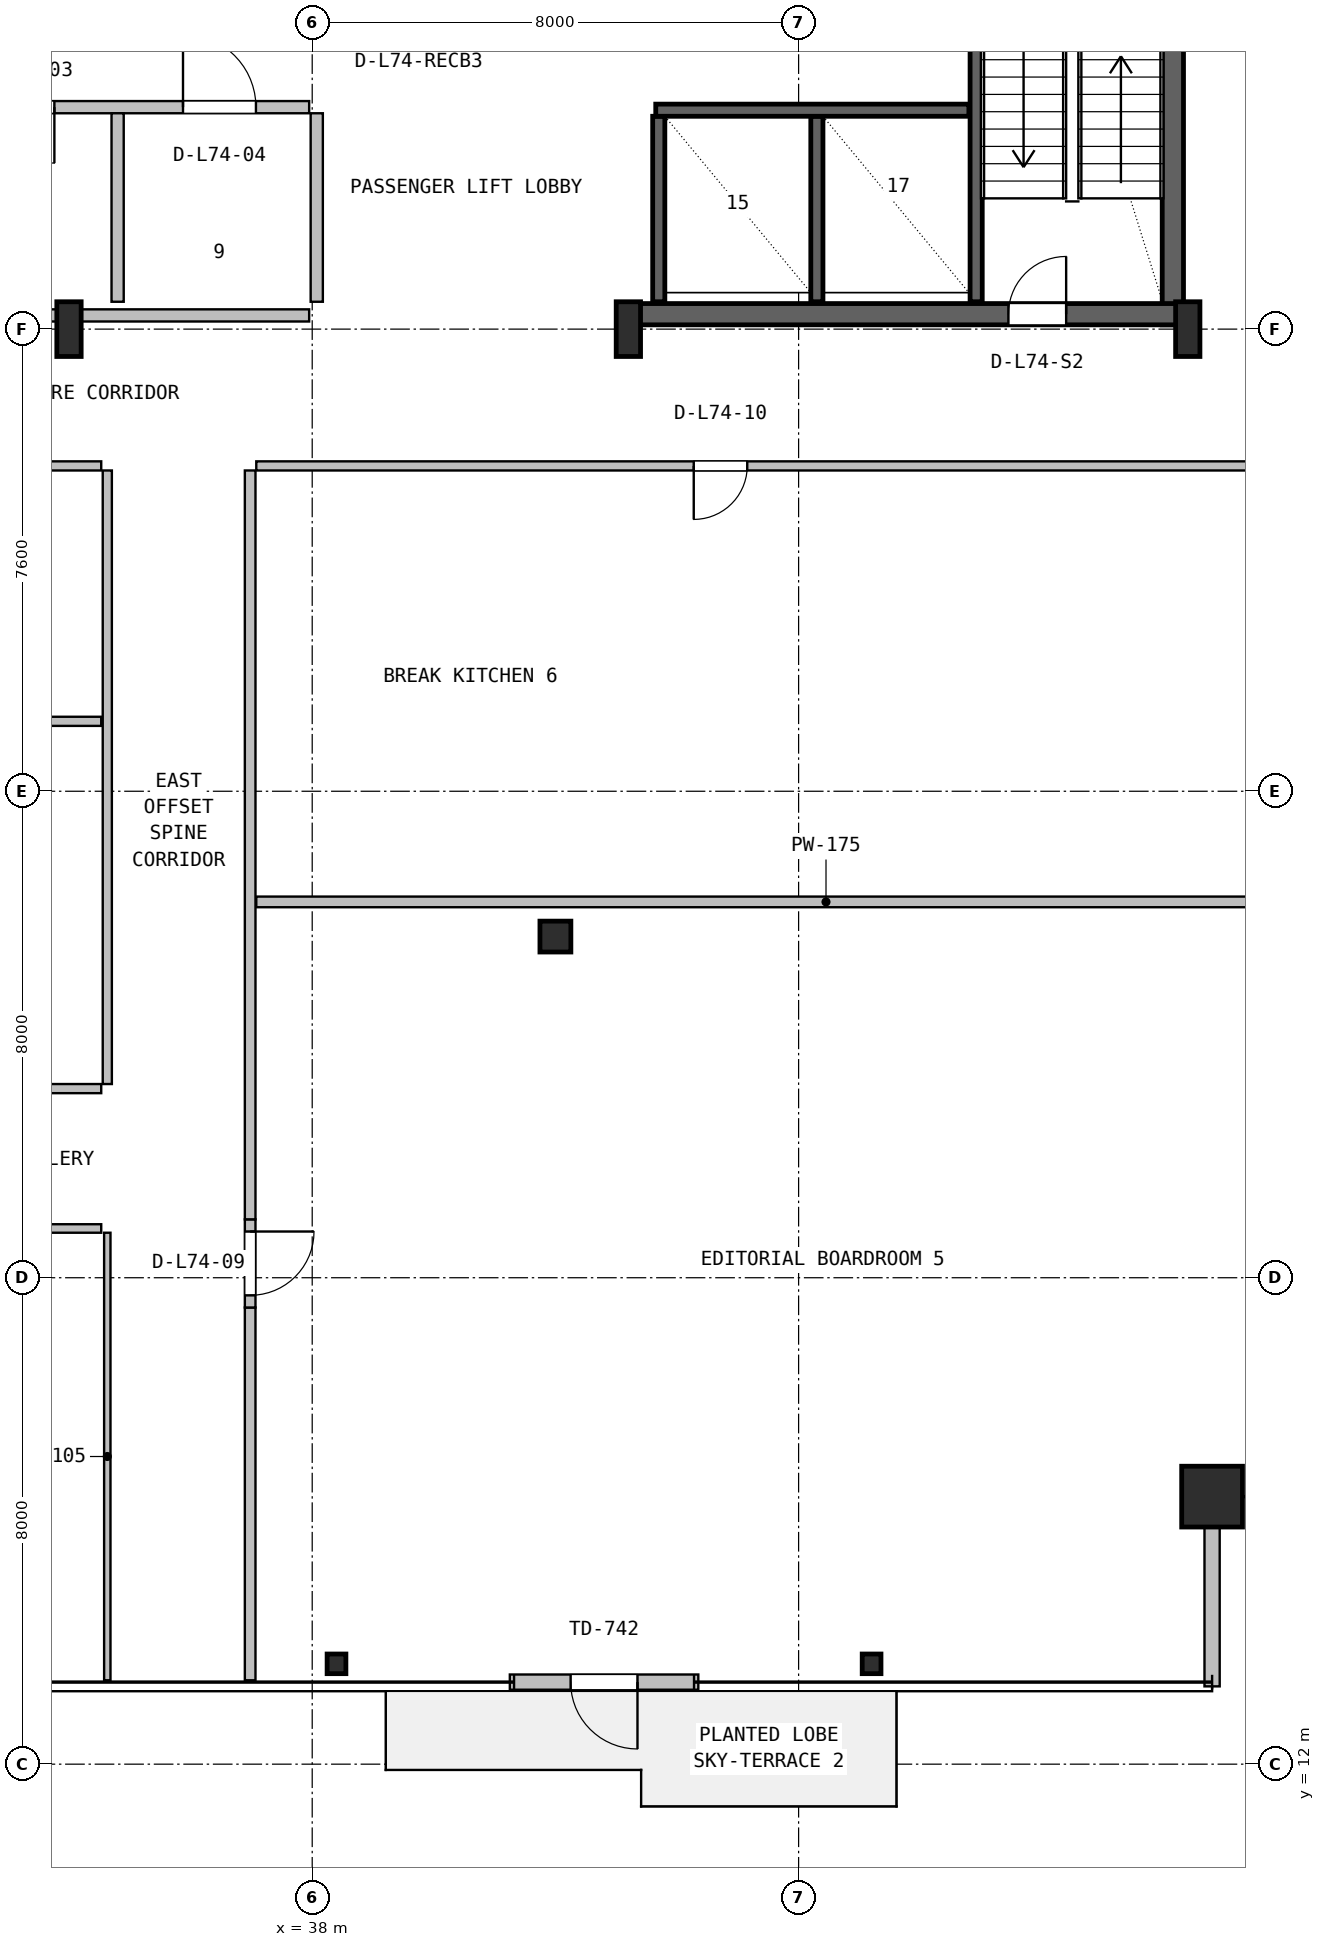
"""IFC4 building model, lengths in metres.
Left out: names, types, materials, properties, quantities, classifications, styles, units other than length and angle.
Written with IfcOpenShell. Run it as: python <this file> out.ifc"""

import sys

from ifc_helpers import new_model, si_unit, direction, frame, frame_2d, origin, origin_2d, place, context, subcontext, project, spatial, rectangle, hollow_rectangle, hollow_circle, i_section, extrude, source, transform, mapped, element, fill, save


model = new_model("IFC4")
c1 = context("Model", 3, precision=1e-05, world=origin(), true_north=direction((0.0, 1.0)))
c2 = subcontext(c1, "Body", "Model", "MODEL_VIEW")
j1 = project(units=[si_unit("LENGTHUNIT", "METRE"), si_unit("PLANEANGLEUNIT", "RADIAN")], contexts=[c1])
p1 = place(None, origin())
s1 = spatial("IfcSite", under=j1, at=p1, CompositionType="ELEMENT")
p2 = place(p1, origin())
s2 = spatial("IfcBuilding", under=s1, at=p2, CompositionType="ELEMENT")
p3 = place(p2, frame((0.0, 0.0, 296.4)))
s3 = spatial("IfcBuildingStorey", under=s2, at=p3, CompositionType="ELEMENT", Elevation=296.4)
p4 = place(p3, frame((52.155, 35.67, 0.0), z_axis=(0.0, 0.0, 1.0), x_axis=(0.0, 1.0, 0.0)))
e1 = element("IfcWall", 1, at=p4, inside=s3, PredefinedType="SHEAR", context=c2, shape_type="SweptSolid", body=[
    extrude(rectangle(XDim=11.13, YDim=0.35, at=frame_2d((5.565, 0.0))), origin(), (0.0, 0.0, 1.0), 3.52),
])
p5 = place(p3, frame((43.2, 35.845, 0.0), z_axis=(0.0, 0.0, 1.0), x_axis=(1.0, 0.0, 0.0)))
e2 = element("IfcWall", 2, at=p5, inside=s3, PredefinedType="SHEAR", context=c2, shape_type="SweptSolid", body=[
    extrude(rectangle(XDim=9.13, YDim=0.35, at=frame_2d((4.565, 0.0))), origin(), (0.0, 0.0, 1.0), 3.52),
])
p6 = place(p5, frame((6.25, 0.0, 0.0)))
e3 = element("IfcOpeningElement", 3, at=p6, cuts=e2, PredefinedType="OPENING", context=c2, shape_type="SweptSolid", body=[
    extrude(rectangle(XDim=0.95, YDim=2.1, at=frame_2d((0.475, 1.05))), frame((0.0, 0.185, 0.0), z_axis=(0.0, -1.0, 0.0), x_axis=(1.0, 0.0, 0.0)), (0.0, 0.0, 1.0), 0.37),
])
m1 = source(origin(), c2, "Body", "SweptSolid", [
    extrude(i_section(OverallWidth=0.4, OverallDepth=0.9, WebThickness=0.016, FlangeThickness=0.028, FilletRadius=0.016, at=origin_2d()), origin(), (0.0, 0.0, 1.0), 3.8),
])
for number, where, z_axis, x_axis in (
    (4, (34.0, 35.6, 0.0), (0.0, 0.0, 1.0), (1.0, 0.0, 0.0)),
    (5, (43.2, 35.6, 0.0), (0.0, 0.0, 1.0), (1.0, 0.0, 0.0)),
    (6, (52.4, 35.6, 0.0), (0.0, 0.0, 1.0), (1.0, 0.0, 0.0)),
):
    element("IfcColumn", number, at=place(p3, frame(where, z_axis=z_axis, x_axis=x_axis)), inside=s3, PredefinedType="COLUMN", context=c2, shape_type="MappedRepresentation", body=[
        mapped(m1, transform((0.0, 0.0, 0.0), x_axis=(1.0, 0.0, 0.0), y_axis=(0.0, 1.0, 0.0), z_axis=(0.0, 0.0, 1.0), scale=1.0)),
    ])
m2 = source(origin(), c2, "Body", "SweptSolid", [
    extrude(hollow_rectangle(XDim=1.0, YDim=1.0, WallThickness=0.04, at=origin_2d()), origin(), (0.0, 0.0, 1.0), 3.8),
])
p7 = place(p3, frame((52.8, 16.4, 0.0), z_axis=(0.0, 0.0, 1.0), x_axis=(1.0, 0.0, 0.0)))
e7 = element("IfcColumn", 7, at=p7, inside=s3, PredefinedType="COLUMN", context=c2, shape_type="MappedRepresentation", body=[
    mapped(m2, transform((0.0, 0.0, 0.0), x_axis=(1.0, 0.0, 0.0), y_axis=(0.0, 1.0, 0.0), z_axis=(0.0, 0.0, 1.0), scale=1.0)),
])
m3 = source(origin(), c2, "Body", "SweptSolid", [
    extrude(i_section(OverallWidth=0.309, OverallDepth=0.323, WebThickness=0.014, FlangeThickness=0.023, FilletRadius=0.015, at=origin_2d()), origin(), (0.0, 0.0, 1.0), 3.8),
])
for number, where, z_axis, x_axis in (
    (8, (38.4, 13.65, 0.0), (0.0, 0.0, 1.0), (1.0, 0.0, 0.0)),
    (9, (47.2, 13.65, 0.0), (0.0, 0.0, 1.0), (1.0, 0.0, 0.0)),
):
    element("IfcColumn", number, at=place(p3, frame(where, z_axis=z_axis, x_axis=x_axis)), inside=s3, PredefinedType="COLUMN", context=c2, shape_type="MappedRepresentation", body=[
        mapped(m3, transform((0.0, 0.0, 0.0), x_axis=(1.0, 0.0, 0.0), y_axis=(0.0, 1.0, 0.0), z_axis=(0.0, 0.0, 1.0), scale=1.0)),
    ])
m4 = source(origin(), c2, "Body", "SweptSolid", [
    extrude(hollow_circle(Radius=0.254, WallThickness=0.02, at=origin_2d()), origin(), (0.0, 0.0, 1.0), 3.8),
])
p8 = place(p3, frame((42.0, 25.61, 0.0), z_axis=(0.0, 0.0, 1.0), x_axis=(1.0, 0.0, 0.0)))
e10 = element("IfcColumn", 10, at=p8, inside=s3, PredefinedType="COLUMN", context=c2, shape_type="MappedRepresentation", body=[
    mapped(m4, transform((0.0, 0.0, 0.0), x_axis=(1.0, 0.0, 0.0), y_axis=(0.0, 1.0, 0.0), z_axis=(0.0, 0.0, 1.0), scale=1.0)),
])
p9 = place(p3, frame((41.25, 13.35, 0.0), z_axis=(0.0, 0.0, 1.0), x_axis=(1.0, 0.0, 0.0)))
e11 = element("IfcWall", 11, at=p9, inside=s3, PredefinedType="SOLIDWALL", context=c2, shape_type="SweptSolid", body=[
    extrude(rectangle(XDim=3.1, YDim=0.25, at=frame_2d((1.55, 0.0))), origin(), (0.0, 0.0, 1.0), 3.5),
])
p10 = place(p9, frame((1.0, 0.0, 0.0)))
e12 = element("IfcOpeningElement", 12, at=p10, cuts=e11, PredefinedType="OPENING", context=c2, shape_type="SweptSolid", body=[
    extrude(rectangle(XDim=1.1, YDim=2.15, at=frame_2d((0.55, 1.075))), frame((0.0, 0.135, 0.0), z_axis=(0.0, -1.0, 0.0), x_axis=(1.0, 0.0, 0.0)), (0.0, 0.0, 1.0), 0.27),
])
p11 = place(p3, frame((52.8, 13.28, 0.0), z_axis=(0.0, 0.0, 1.0), x_axis=(0.0, 1.0, 0.0)))
e13 = element("IfcWall", 13, at=p11, inside=s3, PredefinedType="SOLIDWALL", context=c2, shape_type="SweptSolid", body=[
    extrude(rectangle(XDim=3.2, YDim=0.25, at=frame_2d((1.6, 0.0))), origin(), (0.0, 0.0, 1.0), 3.141),
])
p12 = place(p3, frame((48.92, 36.05, 0.0), z_axis=(0.0, 0.0, 1.0), x_axis=(0.0, 1.0, 0.0)))
e14 = element("IfcWall", 14, at=p12, inside=s3, PredefinedType="SHEAR", context=c2, shape_type="SweptSolid", body=[
    extrude(rectangle(XDim=10.5, YDim=0.2, at=frame_2d((5.25, 0.0))), origin(), (0.0, 0.0, 1.0), 3.52),
])
for number, where, z_axis, x_axis in (
    (15, (43.7, 36.05, 0.0), (0.0, 0.0, 1.0), (0.0, 1.0, 0.0)),
    (16, (46.3, 36.05, 0.0), (0.0, 0.0, 1.0), (0.0, 1.0, 0.0)),
):
    element("IfcWall", number, at=place(p3, frame(where, z_axis=z_axis, x_axis=x_axis)), inside=s3, PredefinedType="SHEAR", context=c2, shape_type="SweptSolid", body=[
        extrude(rectangle(XDim=3.05, YDim=0.2, at=frame_2d((1.525, 0.0))), origin(), (0.0, 0.0, 1.0), 3.52),
    ])
p13 = place(p3, frame((43.65, 39.2, 0.0), z_axis=(0.0, 0.0, 1.0), x_axis=(1.0, 0.0, 0.0)))
e17 = element("IfcWall", 17, at=p13, inside=s3, PredefinedType="SHEAR", context=c2, shape_type="SweptSolid", body=[
    extrude(rectangle(XDim=5.15, YDim=0.2, at=frame_2d((2.575, 0.0))), origin(), (0.0, 0.0, 1.0), 3.52),
])
p14 = place(p3, frame((25.0, 35.825, 0.0), z_axis=(0.0, 0.0, 1.0), x_axis=(1.0, 0.0, 0.0)))
e18 = element("IfcWall", 18, at=p14, inside=s3, PredefinedType="SOLIDWALL", context=c2, shape_type="SweptSolid", body=[
    extrude(rectangle(XDim=12.95, YDim=0.2, at=frame_2d((6.475, 0.0))), origin(), (0.0, 0.0, 1.0), 2.545),
])
p15 = place(p3, frame((25.0, 39.25, 0.0), z_axis=(0.0, 0.0, 1.0), x_axis=(1.0, 0.0, 0.0)))
e19 = element("IfcWall", 19, at=p15, inside=s3, PredefinedType="SOLIDWALL", context=c2, shape_type="SweptSolid", body=[
    extrude(rectangle(XDim=12.95, YDim=0.2, at=frame_2d((6.475, 0.0))), origin(), (0.0, 0.0, 1.0), 3.5),
])
p16 = place(p15, frame((1.1, 0.0, 0.0)))
e20 = element("IfcOpeningElement", 20, at=p16, cuts=e19, PredefinedType="OPENING", context=c2, shape_type="SweptSolid", body=[
    extrude(rectangle(XDim=0.9, YDim=2.06, at=frame_2d((0.45, 1.03))), frame((0.0, 0.11, 0.0), z_axis=(0.0, -1.0, 0.0), x_axis=(1.0, 0.0, 0.0)), (0.0, 0.0, 1.0), 0.22),
])
p17 = place(p15, frame((4.5, 0.0, 0.0)))
e21 = element("IfcOpeningElement", 21, at=p17, cuts=e19, PredefinedType="OPENING", context=c2, shape_type="SweptSolid", body=[
    extrude(rectangle(XDim=0.9, YDim=2.06, at=frame_2d((0.45, 1.03))), frame((0.0, 0.11, 0.0), z_axis=(0.0, -1.0, 0.0), x_axis=(1.0, 0.0, 0.0)), (0.0, 0.0, 1.0), 0.22),
])
p18 = place(p15, frame((7.84, 0.0, 0.0)))
e22 = element("IfcOpeningElement", 22, at=p18, cuts=e19, PredefinedType="OPENING", context=c2, shape_type="SweptSolid", body=[
    extrude(rectangle(XDim=0.92, YDim=2.08, at=frame_2d((0.46, 1.04))), frame((0.0, 0.11, 0.0), z_axis=(0.0, -1.0, 0.0), x_axis=(1.0, 0.0, 0.0)), (0.0, 0.0, 1.0), 0.22),
])
p19 = place(p15, frame((10.875, 0.0, 0.0)))
e23 = element("IfcOpeningElement", 23, at=p19, cuts=e19, PredefinedType="OPENING", context=c2, shape_type="SweptSolid", body=[
    extrude(rectangle(XDim=1.2, YDim=2.1, at=frame_2d((0.6, 1.05))), frame((0.0, 0.11, 0.0), z_axis=(0.0, -1.0, 0.0), x_axis=(1.0, 0.0, 0.0)), (0.0, 0.0, 1.0), 0.22),
])
for number, where, z_axis, x_axis in (
    (24, (34.8, 36.05, 0.0), (0.0, 0.0, 1.0), (0.0, 1.0, 0.0)),
    (25, (38.075, 36.05, 0.0), (0.0, 0.0, 1.0), (0.0, 1.0, 0.0)),
):
    element("IfcWall", number, at=place(p3, frame(where, z_axis=z_axis, x_axis=x_axis)), inside=s3, PredefinedType="SOLIDWALL", context=c2, shape_type="SweptSolid", body=[
        extrude(rectangle(XDim=3.1, YDim=0.2, at=frame_2d((1.55, 0.0))), origin(), (0.0, 0.0, 1.0), 3.5),
    ])
p20 = place(p3, frame((12.18, 20.81, 0.0), z_axis=(0.0, 0.0, 1.0), x_axis=(1.0, 0.0, 0.0)))
e26 = element("IfcWall", 26, at=p20, inside=s3, PredefinedType="PARTITIONING", context=c2, shape_type="SweptSolid", body=[
    extrude(rectangle(XDim=22.35, YDim=0.14, at=frame_2d((11.175, 0.0))), origin(), (0.0, 0.0, 1.0), 2.951),
])
p21 = place(p20, frame((6.32, 0.0, 0.0)))
e27 = element("IfcOpeningElement", 27, at=p21, cuts=e26, PredefinedType="OPENING", context=c2, shape_type="SweptSolid", body=[
    extrude(rectangle(XDim=1.0, YDim=2.1, at=frame_2d((0.5, 1.05))), frame((0.0, 0.08, 0.0), z_axis=(0.0, -1.0, 0.0), x_axis=(1.0, 0.0, 0.0)), (0.0, 0.0, 1.0), 0.16),
])
p22 = place(p20, frame((15.92, 0.0, 0.0)))
e28 = element("IfcOpeningElement", 28, at=p22, cuts=e26, PredefinedType="OPENING", context=c2, shape_type="SweptSolid", body=[
    extrude(rectangle(XDim=0.88, YDim=2.06, at=frame_2d((0.44, 1.03))), frame((0.0, 0.08, 0.0), z_axis=(0.0, -1.0, 0.0), x_axis=(1.0, 0.0, 0.0)), (0.0, 0.0, 1.0), 0.16),
])
p23 = place(p3, frame((34.63, 13.38, 0.0), z_axis=(0.0, 0.0, 1.0), x_axis=(0.0, 1.0, 0.0)))
e29 = element("IfcWall", 29, at=p23, inside=s3, PredefinedType="PARTITIONING", context=c2, shape_type="SweptSolid", body=[
    extrude(rectangle(XDim=7.36, YDim=0.105, at=frame_2d((3.68, 0.0))), origin(), (0.0, 0.0, 1.0), 3.141),
])
p24 = place(p3, frame((12.18, 23.11, 0.0), z_axis=(0.0, 0.0, 1.0), x_axis=(1.0, 0.0, 0.0)))
e30 = element("IfcWall", 30, at=p24, inside=s3, PredefinedType="PARTITIONING", context=c2, shape_type="SweptSolid", body=[
    extrude(rectangle(XDim=22.35, YDim=0.15, at=frame_2d((11.175, 0.0))), origin(), (0.0, 0.0, 1.0), 2.951),
])
p25 = place(p24, frame((12.45, 0.0, 0.0)))
e31 = element("IfcOpeningElement", 31, at=p25, cuts=e30, PredefinedType="OPENING", context=c2, shape_type="SweptSolid", body=[
    extrude(rectangle(XDim=0.92, YDim=2.08, at=frame_2d((0.46, 1.04))), frame((0.0, 0.085, 0.0), z_axis=(0.0, -1.0, 0.0), x_axis=(1.0, 0.0, 0.0)), (0.0, 0.0, 1.0), 0.17),
])
p26 = place(p3, frame((34.63, 23.185, 0.0), z_axis=(0.0, 0.0, 1.0), x_axis=(0.0, 1.0, 0.0)))
e32 = element("IfcWall", 32, at=p26, inside=s3, PredefinedType="PARTITIONING", context=c2, shape_type="SweptSolid", body=[
    extrude(rectangle(XDim=10.09, YDim=0.15, at=frame_2d((5.045, 0.0))), origin(), (0.0, 0.0, 1.0), 1.895),
])
p27 = place(p3, frame((12.18, 29.15, 0.0), z_axis=(0.0, 0.0, 1.0), x_axis=(1.0, 0.0, 0.0)))
e33 = element("IfcWall", 33, at=p27, inside=s3, PredefinedType="PARTITIONING", context=c2, shape_type="SweptSolid", body=[
    extrude(rectangle(XDim=22.35, YDim=0.15, at=frame_2d((11.175, 0.0))), origin(), (0.0, 0.0, 1.0), 2.165),
])
p28 = place(p3, frame((12.18, 33.35, 0.0), z_axis=(0.0, 0.0, 1.0), x_axis=(1.0, 0.0, 0.0)))
e34 = element("IfcWall", 34, at=p28, inside=s3, PredefinedType="PARTITIONING", context=c2, shape_type="SweptSolid", body=[
    extrude(rectangle(XDim=22.35, YDim=0.15, at=frame_2d((11.175, 0.0))), origin(), (0.0, 0.0, 1.0), 2.165),
])
p29 = place(p28, frame((12.45, 0.0, 0.0)))
e35 = element("IfcOpeningElement", 35, at=p29, cuts=e34, PredefinedType="OPENING", context=c2, shape_type="SweptSolid", body=[
    extrude(rectangle(XDim=0.92, YDim=2.08, at=frame_2d((0.46, 1.04))), frame((0.0, 0.085, 0.0), z_axis=(0.0, -1.0, 0.0), x_axis=(1.0, 0.0, 0.0)), (0.0, 0.0, 1.0), 0.17),
])
p30 = place(p3, frame((37.08, 26.18, 0.0), z_axis=(0.0, 0.0, 1.0), x_axis=(1.0, 0.0, 0.0)))
e36 = element("IfcWall", 36, at=p30, inside=s3, PredefinedType="PARTITIONING", context=c2, shape_type="SweptSolid", body=[
    extrude(rectangle(XDim=18.74, YDim=0.175, at=frame_2d((9.37, 0.0))), origin(), (0.0, 0.0, 1.0), 2.951),
])
p31 = place(p3, frame((36.98, 13.38, 0.0), z_axis=(0.0, 0.0, 1.0), x_axis=(0.0, 1.0, 0.0)))
e37 = element("IfcWall", 37, at=p31, inside=s3, PredefinedType="PARTITIONING", context=c2, shape_type="SweptSolid", body=[
    extrude(rectangle(XDim=6.13, YDim=0.175, at=frame_2d((3.065, 0.0))), origin(), (0.0, 0.0, 1.0), 3.141),
])
p32 = place(p3, frame((36.98, 19.51, 0.0), z_axis=(0.0, 0.0, 1.0), x_axis=(0.0, 1.0, 0.0)))
e38 = element("IfcWall", 38, at=p32, inside=s3, PredefinedType="PARTITIONING", context=c2, shape_type="SweptSolid", body=[
    extrude(rectangle(XDim=1.45, YDim=0.175, at=frame_2d((0.725, 0.0))), origin(), (0.0, 0.0, 1.0), 3.5),
])
p33 = place(p32, frame((0.2, 0.0, 0.0)))
e39 = element("IfcOpeningElement", 39, at=p33, cuts=e38, PredefinedType="OPENING", context=c2, shape_type="SweptSolid", body=[
    extrude(rectangle(XDim=1.05, YDim=2.1, at=frame_2d((0.525, 1.05))), frame((0.0, 0.098, 0.0), z_axis=(0.0, -1.0, 0.0), x_axis=(1.0, 0.0, 0.0)), (0.0, 0.0, 1.0), 0.195),
])
p34 = place(p3, frame((36.98, 20.96, 0.0), z_axis=(0.0, 0.0, 1.0), x_axis=(0.0, 1.0, 0.0)))
e40 = element("IfcWall", 40, at=p34, inside=s3, PredefinedType="PARTITIONING", context=c2, shape_type="SweptSolid", body=[
    extrude(rectangle(XDim=12.315, YDim=0.175, at=frame_2d((6.157, 0.0))), origin(), (0.0, 0.0, 1.0), 1.895),
])
p35 = place(p3, frame((37.08, 33.35, 0.0), z_axis=(0.0, 0.0, 1.0), x_axis=(1.0, 0.0, 0.0)))
e41 = element("IfcWall", 41, at=p35, inside=s3, PredefinedType="PARTITIONING", context=c2, shape_type="SweptSolid", body=[
    extrude(rectangle(XDim=18.74, YDim=0.15, at=frame_2d((9.37, 0.0))), origin(), (0.0, 0.0, 1.0), 2.951),
])
p36 = place(p35, frame((7.195, 0.0, 0.0)))
e42 = element("IfcOpeningElement", 42, at=p36, cuts=e41, PredefinedType="OPENING", context=c2, shape_type="SweptSolid", body=[
    extrude(rectangle(XDim=0.88, YDim=2.06, at=frame_2d((0.44, 1.03))), frame((0.0, 0.085, 0.0), z_axis=(0.0, -1.0, 0.0), x_axis=(1.0, 0.0, 0.0)), (0.0, 0.0, 1.0), 0.17),
])
m5 = source(origin(), c2, "Body", "SweptSolid", [
    extrude(rectangle(XDim=1.1, YDim=2.15, at=frame_2d((0.55, 1.075))), frame((0.0, 0.025, 0.0), z_axis=(0.0, -1.0, 0.0), x_axis=(1.0, 0.0, 0.0)), (0.0, 0.0, 1.0), 0.05),
])
p37 = place(p10, frame((1.1, 0.0, 0.0), z_axis=(0.0, 0.0, 1.0), x_axis=(-1.0, 0.0, 0.0)))
e43 = element("IfcDoor", 43, at=p37, inside=s3, OperationType="SINGLE_SWING_RIGHT", PredefinedType="DOOR", context=c2, shape_type="MappedRepresentation", body=[
    mapped(m5, transform((0.0, 0.0, 0.0), x_axis=(1.0, 0.0, 0.0), y_axis=(0.0, 1.0, 0.0), z_axis=(0.0, 0.0, 1.0), scale=1.0)),
])
fill(e12, e43)
m6 = source(origin(), c2, "Body", "SweptSolid", [
    extrude(rectangle(XDim=0.95, YDim=2.1, at=frame_2d((0.475, 1.05))), frame((0.0, 0.025, 0.0), z_axis=(0.0, -1.0, 0.0), x_axis=(1.0, 0.0, 0.0)), (0.0, 0.0, 1.0), 0.05),
])
p38 = place(p6, origin())
e44 = element("IfcDoor", 44, at=p38, inside=s3, OperationType="SINGLE_SWING_RIGHT", PredefinedType="DOOR", context=c2, shape_type="MappedRepresentation", body=[
    mapped(m6, transform((0.0, 0.0, 0.0), x_axis=(1.0, 0.0, 0.0), y_axis=(0.0, 1.0, 0.0), z_axis=(0.0, 0.0, 1.0), scale=1.0)),
])
fill(e3, e44)
m7 = source(origin(), c2, "Body", "SweptSolid", [
    extrude(rectangle(XDim=0.92, YDim=2.08, at=frame_2d((0.46, 1.04))), frame((0.0, 0.025, 0.0), z_axis=(0.0, -1.0, 0.0), x_axis=(1.0, 0.0, 0.0)), (0.0, 0.0, 1.0), 0.05),
])
p39 = place(p18, frame((0.92, 0.0, 0.0), z_axis=(0.0, 0.0, 1.0), x_axis=(-1.0, 0.0, 0.0)))
e45 = element("IfcDoor", 45, at=p39, inside=s3, OperationType="SINGLE_SWING_RIGHT", PredefinedType="DOOR", context=c2, shape_type="MappedRepresentation", body=[
    mapped(m7, transform((0.0, 0.0, 0.0), x_axis=(1.0, 0.0, 0.0), y_axis=(0.0, 1.0, 0.0), z_axis=(0.0, 0.0, 1.0), scale=1.0)),
])
fill(e22, e45)
m8 = source(origin(), c2, "Body", "SweptSolid", [
    extrude(rectangle(XDim=1.2, YDim=2.1, at=frame_2d((0.6, 1.05))), frame((0.0, 0.025, 0.0), z_axis=(0.0, -1.0, 0.0), x_axis=(1.0, 0.0, 0.0)), (0.0, 0.0, 1.0), 0.05),
])
p40 = place(p19, origin())
e46 = element("IfcDoor", 46, at=p40, inside=s3, OperationType="SINGLE_SWING_LEFT", PredefinedType="DOOR", context=c2, shape_type="MappedRepresentation", body=[
    mapped(m8, transform((0.0, 0.0, 0.0), x_axis=(1.0, 0.0, 0.0), y_axis=(0.0, 1.0, 0.0), z_axis=(0.0, 0.0, 1.0), scale=1.0)),
])
fill(e23, e46)
m9 = source(origin(), c2, "Body", "SweptSolid", [
    extrude(rectangle(XDim=1.05, YDim=2.1, at=frame_2d((0.525, 1.05))), frame((0.0, 0.025, 0.0), z_axis=(0.0, -1.0, 0.0), x_axis=(1.0, 0.0, 0.0)), (0.0, 0.0, 1.0), 0.05),
])
p41 = place(p33, frame((1.05, 0.0, 0.0), z_axis=(0.0, 0.0, 1.0), x_axis=(-1.0, 0.0, 0.0)))
e47 = element("IfcDoor", 47, at=p41, inside=s3, OperationType="SINGLE_SWING_RIGHT", PredefinedType="DOOR", context=c2, shape_type="MappedRepresentation", body=[
    mapped(m9, transform((0.0, 0.0, 0.0), x_axis=(1.0, 0.0, 0.0), y_axis=(0.0, 1.0, 0.0), z_axis=(0.0, 0.0, 1.0), scale=1.0)),
])
fill(e39, e47)
m10 = source(origin(), c2, "Body", "SweptSolid", [
    extrude(rectangle(XDim=0.88, YDim=2.06, at=frame_2d((0.44, 1.03))), frame((0.0, 0.025, 0.0), z_axis=(0.0, -1.0, 0.0), x_axis=(1.0, 0.0, 0.0)), (0.0, 0.0, 1.0), 0.05),
])
p42 = place(p36, frame((0.88, 0.0, 0.0), z_axis=(0.0, 0.0, 1.0), x_axis=(-1.0, 0.0, 0.0)))
e48 = element("IfcDoor", 48, at=p42, inside=s3, OperationType="SINGLE_SWING_LEFT", PredefinedType="DOOR", context=c2, shape_type="MappedRepresentation", body=[
    mapped(m10, transform((0.0, 0.0, 0.0), x_axis=(1.0, 0.0, 0.0), y_axis=(0.0, 1.0, 0.0), z_axis=(0.0, 0.0, 1.0), scale=1.0)),
])
fill(e42, e48)
save(model, sys.argv[1])
